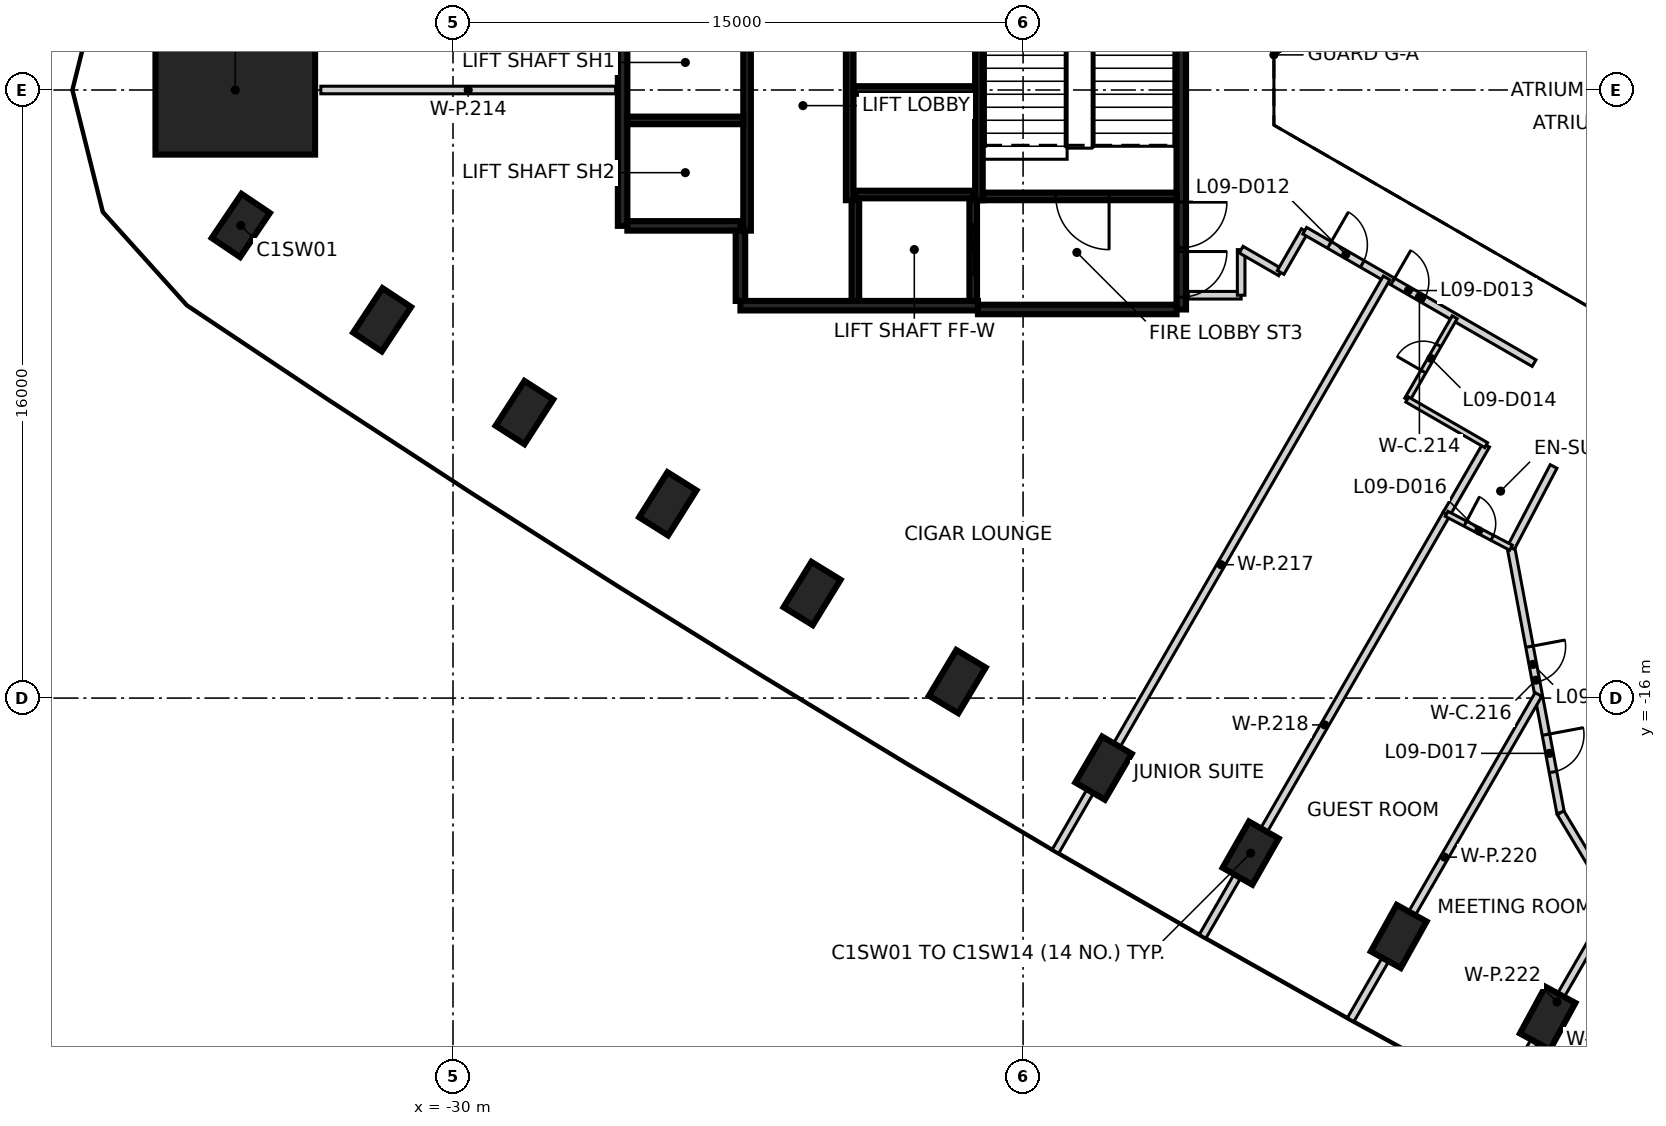
"""IFC4 building model, lengths in metres.
Left out: names, types, materials, properties, quantities, classifications, styles, units other than length and angle.
Written with IfcOpenShell. Run it as: python <this file> out.ifc"""

import sys

from ifc_helpers import new_model, si_unit, direction, frame, frame_2d, origin, origin_2d, place, context, subcontext, project, spatial, rectangle, extrude, element, fill, save


model = new_model("IFC4")
c1 = context("Model", 3, precision=1e-05, world=origin(), true_north=direction((0.0, 1.0)))
c2 = subcontext(c1, "Body", "Model", "MODEL_VIEW")
j1 = project(units=[si_unit("LENGTHUNIT", "METRE"), si_unit("PLANEANGLEUNIT", "RADIAN")], contexts=[c1])
p1 = place(None, origin())
s1 = spatial("IfcSite", under=j1, at=p1, CompositionType="ELEMENT")
p2 = place(p1, origin())
s2 = spatial("IfcBuilding", under=s1, at=p2, CompositionType="ELEMENT")
p3 = place(p2, frame((0.0, 0.0, 45.8)))
s3 = spatial("IfcBuildingStorey", under=s2, at=p3, CompositionType="ELEMENT", Elevation=45.8)
for number, where, z_axis, x_axis in (
    (1, (-35.583, -3.565, -0.475), (0.0, 0.0, 1.0), (0.559, 0.829, 0.0)),
    (2, (-31.865, -6.046, -0.475), (0.0, 0.0, 1.0), (0.551, 0.835, 0.0)),
    (3, (-28.12, -8.488, -0.475), (0.0, 0.0, 1.0), (0.541, 0.841, 0.0)),
    (4, (-24.349, -10.888, -0.475), (0.0, 0.0, 1.0), (0.532, 0.846, 0.0)),
    (5, (-20.552, -13.248, -0.475), (0.0, 0.0, 1.0), (0.523, 0.852, 0.0)),
    (6, (-16.73, -15.566, -0.475), (0.0, 0.0, 1.0), (0.514, 0.858, 0.0)),
    (7, (-12.883, -17.844, -0.475), (0.0, 0.0, 1.0), (0.505, 0.863, 0.0)),
    (8, (-9.011, -20.079, -0.475), (0.0, 0.0, 1.0), (0.495, 0.869, 0.0)),
    (9, (-5.116, -22.272, -0.475), (0.0, 0.0, 1.0), (0.486, 0.874, 0.0)),
    (10, (-1.197, -24.423, -0.475), (0.0, 0.0, 1.0), (0.476, 0.879, 0.0)),
):
    element("IfcColumn", number, at=place(p3, frame(where, z_axis=z_axis, x_axis=x_axis)), inside=s3, PredefinedType="COLUMN", context=c2, shape_type="SweptSolid", body=[
        extrude(rectangle(XDim=1.4, YDim=0.9, at=origin_2d()), origin(), (0.0, 0.0, 1.0), 3.6),
    ])
p4 = place(p3, frame((-35.729, 0.0, -0.475), z_axis=(0.0, 0.0, 1.0), x_axis=(1.0, 0.0, 0.0)))
e11 = element("IfcColumn", 11, at=p4, inside=s3, PredefinedType="COLUMN", context=c2, shape_type="SweptSolid", body=[
    extrude(rectangle(XDim=4.2, YDim=3.4, at=origin_2d()), origin(), (0.0, 0.0, 1.0), 3.6),
])
p5 = place(p3, frame((-10.837, 5.775, 0.0), z_axis=(0.0, 0.0, 1.0), x_axis=(0.0, -1.0, 0.0)))
e12 = element("IfcWall", 12, at=p5, inside=s3, PredefinedType="SHEAR", context=c2, shape_type="SweptSolid", body=[
    extrude(rectangle(XDim=11.55, YDim=0.25, at=frame_2d((5.775, 0.0))), origin(), (0.0, 0.0, 1.0), 3.125),
])
p6 = place(p5, frame((10.025, 0.0, 0.0)))
e13 = element("IfcOpeningElement", 13, at=p6, cuts=e12, PredefinedType="OPENING", context=c2, shape_type="SweptSolid", body=[
    extrude(rectangle(XDim=1.2, YDim=2.1, at=frame_2d((0.6, 1.05))), frame((0.0, 0.135, 0.0), z_axis=(0.0, -1.0, 0.0), x_axis=(1.0, 0.0, 0.0)), (0.0, 0.0, 1.0), 0.27),
])
p7 = place(p5, frame((8.725, 0.0, 0.0)))
e14 = element("IfcOpeningElement", 14, at=p7, cuts=e12, PredefinedType="OPENING", context=c2, shape_type="SweptSolid", body=[
    extrude(rectangle(XDim=1.2, YDim=2.1, at=frame_2d((0.6, 1.05))), frame((0.0, 0.135, 0.0), z_axis=(0.0, -1.0, 0.0), x_axis=(1.0, 0.0, 0.0)), (0.0, 0.0, 1.0), 0.27),
])
p8 = place(p3, frame((-16.187, -5.675, 0.0), z_axis=(0.0, 0.0, 1.0), x_axis=(-1.0, 0.0, 0.0)))
e15 = element("IfcWall", 15, at=p8, inside=s3, PredefinedType="SHEAR", context=c2, shape_type="SweptSolid", body=[
    extrude(rectangle(XDim=6.25, YDim=0.25, at=frame_2d((3.125, 0.0))), origin(), (0.0, 0.0, 1.0), 3.125),
])
p9 = place(p3, frame((-25.537, -3.575, 0.0), z_axis=(0.0, 0.0, 1.0), x_axis=(0.0, 1.0, 0.0)))
e16 = element("IfcWall", 16, at=p9, inside=s3, PredefinedType="SHEAR", context=c2, shape_type="SweptSolid", body=[
    extrude(rectangle(XDim=5.85, YDim=0.25, at=frame_2d((2.925, 0.0))), origin(), (0.0, 0.0, 1.0), 3.125),
])
p10 = place(p3, frame((-10.963, -5.775, 0.0), z_axis=(0.0, 0.0, 1.0), x_axis=(-1.0, 0.0, 0.0)))
e17 = element("IfcWall", 17, at=p10, inside=s3, PredefinedType="SHEAR", context=c2, shape_type="SweptSolid", body=[
    extrude(rectangle(XDim=5.225, YDim=0.25, at=frame_2d((2.612, 0.0))), origin(), (0.0, 0.0, 1.0), 3.125),
])
p11 = place(p3, frame((-22.437, -3.575, 0.0), z_axis=(0.0, 0.0, 1.0), x_axis=(-1.0, 0.0, 0.0)))
e18 = element("IfcWall", 18, at=p11, inside=s3, PredefinedType="SHEAR", context=c2, shape_type="SweptSolid", body=[
    extrude(rectangle(XDim=2.975, YDim=0.25, at=frame_2d((1.487, 0.0))), origin(), (0.0, 0.0, 1.0), 3.125),
])
p12 = place(p3, frame((-22.437, -5.55, 0.0), z_axis=(0.0, 0.0, 1.0), x_axis=(0.0, 1.0, 0.0)))
e19 = element("IfcWall", 19, at=p12, inside=s3, PredefinedType="SHEAR", context=c2, shape_type="SweptSolid", body=[
    extrude(rectangle(XDim=1.849, YDim=0.25, at=frame_2d((0.925, 0.0))), origin(), (0.0, 0.0, 1.0), 3.125),
])
p13 = place(p3, frame((-16.162, 2.951, 0.0), z_axis=(0.0, 0.0, 1.0), x_axis=(0.0, -1.0, 0.0)))
e20 = element("IfcWall", 20, at=p13, inside=s3, PredefinedType="SHEAR", context=c2, shape_type="SweptSolid", body=[
    extrude(rectangle(XDim=5.851, YDim=0.2, at=frame_2d((2.925, 0.0))), origin(), (0.0, 0.0, 1.0), 3.125),
])
for number, where, z_axis, x_axis in (
    (21, (-19.562, -2.9, 0.0), (0.0, 0.0, 1.0), (0.0, 1.0, 0.0)),
    (22, (-22.262, 2.4, 0.0), (0.0, 0.0, 1.0), (0.0, -1.0, 0.0)),
):
    element("IfcWall", number, at=place(p3, frame(where, z_axis=z_axis, x_axis=x_axis)), inside=s3, PredefinedType="SHEAR", context=c2, shape_type="SweptSolid", body=[
        extrude(rectangle(XDim=6.1, YDim=0.2, at=frame_2d((3.05, 0.0))), origin(), (0.0, 0.0, 1.0), 3.125),
    ])
p14 = place(p3, frame((-10.963, -2.8, 0.0), z_axis=(0.0, 0.0, 1.0), x_axis=(-1.0, 0.0, 0.0)))
e23 = element("IfcWall", 23, at=p14, inside=s3, PredefinedType="SHEAR", context=c2, shape_type="SweptSolid", body=[
    extrude(rectangle(XDim=5.098, YDim=0.2, at=frame_2d((2.549, 0.0))), origin(), (0.0, 0.0, 1.0), 3.125),
])
p15 = place(p14, frame((1.774, 0.0, 0.0)))
e24 = element("IfcOpeningElement", 24, at=p15, cuts=e23, PredefinedType="OPENING", context=c2, shape_type="SweptSolid", body=[
    extrude(rectangle(XDim=1.4, YDim=2.1, at=frame_2d((0.7, 1.05))), frame((0.0, 0.11, 0.0), z_axis=(0.0, -1.0, 0.0), x_axis=(1.0, 0.0, 0.0)), (0.0, 0.0, 1.0), 0.22),
])
p16 = place(p3, frame((-16.263, 0.0, 0.0), z_axis=(0.0, 0.0, 1.0), x_axis=(-1.0, 0.0, 0.0)))
e25 = element("IfcWall", 25, at=p16, inside=s3, PredefinedType="SHEAR", context=c2, shape_type="SweptSolid", body=[
    extrude(rectangle(XDim=3.198, YDim=0.2, at=frame_2d((1.599, 0.0))), origin(), (0.0, 0.0, 1.0), 3.125),
])
p17 = place(p3, frame((-22.363, -0.8, 0.0), z_axis=(0.0, 0.0, 1.0), x_axis=(-1.0, 0.0, 0.0)))
e26 = element("IfcWall", 26, at=p17, inside=s3, PredefinedType="SHEAR", context=c2, shape_type="SweptSolid", body=[
    extrude(rectangle(XDim=3.048, YDim=0.2, at=frame_2d((1.524, 0.0))), origin(), (0.0, 0.0, 1.0), 3.125),
])
p18 = place(p3, frame((-19.412, -2.75, 0.0), z_axis=(0.0, 0.0, 1.0), x_axis=(1.0, 0.0, 0.0)))
e27 = element("IfcWall", 27, at=p18, inside=s3, PredefinedType="SHEAR", context=c2, shape_type="SweptSolid", body=[
    extrude(rectangle(XDim=3.1, YDim=0.2, at=frame_2d((1.55, 0.0))), origin(), (0.0, 0.0, 1.0), 3.125),
])
p19 = place(p3, frame((-16.312, -2.898, 0.0), z_axis=(0.0, 0.0, 1.0), x_axis=(0.0, -1.0, 0.0)))
e28 = element("IfcWall", 28, at=p19, inside=s3, PredefinedType="SHEAR", context=c2, shape_type="SweptSolid", body=[
    extrude(rectangle(XDim=2.651, YDim=0.2, at=frame_2d((1.325, 0.0))), origin(), (0.0, 0.0, 1.0), 3.125),
])
p20 = place(p19, frame((0.652, 0.0, 0.0)))
e29 = element("IfcOpeningElement", 29, at=p20, cuts=e28, PredefinedType="OPENING", context=c2, shape_type="SweptSolid", body=[
    extrude(rectangle(XDim=1.3, YDim=2.1, at=frame_2d((0.65, 1.05))), frame((0.0, 0.11, 0.0), z_axis=(0.0, -1.0, 0.0), x_axis=(1.0, 0.0, 0.0)), (0.0, 0.0, 1.0), 0.22),
])
p21 = place(p3, frame((-19.412, -5.549, 0.0), z_axis=(0.0, 0.0, 1.0), x_axis=(0.0, 1.0, 0.0)))
e30 = element("IfcWall", 30, at=p21, inside=s3, PredefinedType="SHEAR", context=c2, shape_type="SweptSolid", body=[
    extrude(rectangle(XDim=2.651, YDim=0.2, at=frame_2d((1.325, 0.0))), origin(), (0.0, 0.0, 1.0), 3.125),
])
p22 = place(p3, frame((-10.652, -5.4, 0.0), z_axis=(0.0, 0.0, 1.0), x_axis=(1.0, 0.0, 0.0)))
e31 = element("IfcWall", 31, at=p22, inside=s3, PredefinedType="PARTITIONING", context=c2, shape_type="SweptSolid", body=[
    extrude(rectangle(XDim=1.39, YDim=0.2, at=frame_2d((0.695, 0.0))), origin(), (0.0, 0.0, 1.0), 3.125),
])
for number, where, z_axis, x_axis in (
    (32, (-9.262, -5.4, 0.0), (0.0, 0.0, 1.0), (0.0, 1.0, 0.0)),
    (33, (-9.262, -4.2, 0.0), (0.0, 0.0, 1.0), (0.866, -0.5, 0.0)),
):
    element("IfcWall", number, at=place(p3, frame(where, z_axis=z_axis, x_axis=x_axis)), inside=s3, PredefinedType="PARTITIONING", context=c2, shape_type="SweptSolid", body=[
        extrude(rectangle(XDim=1.2, YDim=0.2, at=frame_2d((0.6, 0.0))), origin(), (0.0, 0.0, 1.0), 3.125),
    ])
p23 = place(p3, frame((-8.223, -4.8, 0.0), z_axis=(0.0, 0.0, 1.0), x_axis=(0.499866914522, 0.866102227088, 0.0)))
e34 = element("IfcWall", 34, at=p23, inside=s3, PredefinedType="PARTITIONING", context=c2, shape_type="SweptSolid", body=[
    extrude(rectangle(XDim=1.268, YDim=0.2, at=frame_2d((0.634, 0.0))), origin(), (0.0, 0.0, 1.0), 3.125),
])
p24 = place(p3, frame((-7.589, -3.702, 0.0), z_axis=(0.0, 0.0, 1.0), x_axis=(0.865994210678, -0.500054024153, 0.0)))
e35 = element("IfcWall", 35, at=p24, inside=s3, PredefinedType="PARTITIONING", context=c2, shape_type="SweptSolid", body=[
    extrude(rectangle(XDim=6.969, YDim=0.2, at=frame_2d((3.484, 0.0))), origin(), (0.0, 0.0, 1.0), 3.125),
])
p25 = place(p24, frame((0.749, 0.0, 0.0)))
e36 = element("IfcOpeningElement", 36, at=p25, cuts=e35, PredefinedType="OPENING", context=c2, shape_type="SweptSolid", body=[
    extrude(rectangle(XDim=1.0, YDim=2.1, at=frame_2d((0.5, 1.05))), frame((0.0, 0.11, 0.0), z_axis=(0.0, -1.0, 0.0), x_axis=(1.0, 0.0, 0.0)), (0.0, 0.0, 1.0), 0.22),
])
p26 = place(p24, frame((2.674, 0.0, 0.0)))
e37 = element("IfcOpeningElement", 37, at=p26, cuts=e35, PredefinedType="OPENING", context=c2, shape_type="SweptSolid", body=[
    extrude(rectangle(XDim=0.95, YDim=2.1, at=frame_2d((0.475, 1.05))), frame((0.0, 0.11, 0.0), z_axis=(0.0, -1.0, 0.0), x_axis=(1.0, 0.0, 0.0)), (0.0, 0.0, 1.0), 0.22),
])
p27 = place(p3, frame((-2.162, -12.042, 0.0), z_axis=(0.0, 0.0, 1.0), x_axis=(0.183949825522, -0.982935634561, 0.0)))
e38 = element("IfcWall", 38, at=p27, inside=s3, PredefinedType="PARTITIONING", context=c2, shape_type="SweptSolid", body=[
    extrude(rectangle(XDim=7.094, YDim=0.2, at=frame_2d((3.547, 0.0))), origin(), (0.0, 0.0, 1.0), 3.125),
])
p28 = place(p27, frame((2.65, 0.0, 0.0)))
e39 = element("IfcOpeningElement", 39, at=p28, cuts=e38, PredefinedType="OPENING", context=c2, shape_type="SweptSolid", body=[
    extrude(rectangle(XDim=0.95, YDim=2.1, at=frame_2d((0.475, 1.05))), frame((0.0, 0.11, 0.0), z_axis=(0.0, -1.0, 0.0), x_axis=(1.0, 0.0, 0.0)), (0.0, 0.0, 1.0), 0.22),
])
p29 = place(p27, frame((5.006, 0.0, 0.0)))
e40 = element("IfcOpeningElement", 40, at=p29, cuts=e38, PredefinedType="OPENING", context=c2, shape_type="SweptSolid", body=[
    extrude(rectangle(XDim=1.0, YDim=2.1, at=frame_2d((0.5, 1.05))), frame((0.0, 0.11, 0.0), z_axis=(0.0, -1.0, 0.0), x_axis=(1.0, 0.0, 0.0)), (0.0, 0.0, 1.0), 0.22),
])
p30 = place(p3, frame((-2.162, -12.041, 0.0), z_axis=(0.0, 0.0, 1.0), x_axis=(0.464903343334, 0.885361441083, 0.0)))
e41 = element("IfcWall", 41, at=p30, inside=s3, PredefinedType="PARTITIONING", context=c2, shape_type="SweptSolid", body=[
    extrude(rectangle(XDim=2.411, YDim=0.2, at=frame_2d((1.206, 0.0))), origin(), (0.0, 0.0, 1.0), 3.125),
])
p31 = place(p3, frame((-0.858, -19.017, 0.0), z_axis=(0.0, 0.0, 1.0), x_axis=(0.514647068805, -0.857402119528, 0.0)))
e42 = element("IfcWall", 42, at=p31, inside=s3, PredefinedType="PARTITIONING", context=c2, shape_type="SweptSolid", body=[
    extrude(rectangle(XDim=4.745, YDim=0.2, at=frame_2d((2.373, 0.0))), origin(), (0.0, 0.0, 1.0), 3.125),
])
p32 = place(p3, frame((-33.478, 0.0, 0.0), z_axis=(0.0, 0.0, 1.0), x_axis=(1.0, 0.0, 0.0)))
e43 = element("IfcWall", 43, at=p32, inside=s3, PredefinedType="PARTITIONING", context=c2, shape_type="SweptSolid", body=[
    extrude(rectangle(XDim=7.756, YDim=0.2, at=frame_2d((3.878, 0.0))), origin(), (0.0, 0.0, 1.0), 3.125),
])
p33 = place(p3, frame((-14.148, -20.035, 0.0), z_axis=(0.0, 0.0, 1.0), x_axis=(0.499978771293, 0.866037659837, 0.0)))
e44 = element("IfcWall", 44, at=p33, inside=s3, PredefinedType="PARTITIONING", context=c2, shape_type="SweptSolid", body=[
    extrude(rectangle(XDim=17.425, YDim=0.2, at=frame_2d((8.712, 0.0))), origin(), (0.0, 0.0, 1.0), 3.125),
])
p34 = place(p3, frame((-10.276, -22.271, 0.0), z_axis=(0.0, 0.0, 1.0), x_axis=(0.499984478165, 0.866034365135, 0.0)))
e45 = element("IfcWall", 45, at=p34, inside=s3, PredefinedType="PARTITIONING", context=c2, shape_type="SweptSolid", body=[
    extrude(rectangle(XDim=12.851, YDim=0.2, at=frame_2d((6.426, 0.0))), origin(), (0.0, 0.0, 1.0), 3.125),
])
p35 = place(p3, frame((-6.381, -24.464, 0.0), z_axis=(0.0, 0.0, 1.0), x_axis=(0.500007577232, 0.866021029023, 0.0)))
e46 = element("IfcWall", 46, at=p35, inside=s3, PredefinedType="PARTITIONING", context=c2, shape_type="SweptSolid", body=[
    extrude(rectangle(XDim=9.883, YDim=0.2, at=frame_2d((4.941, 0.0))), origin(), (0.0, 0.0, 1.0), 3.125),
])
p36 = place(p3, frame((-3.863, -11.163, 0.0), z_axis=(0.0, 0.0, 1.0), x_axis=(0.499779509621, 0.866152666545, 0.0)))
e47 = element("IfcWall", 47, at=p36, inside=s3, PredefinedType="PARTITIONING", context=c2, shape_type="SweptSolid", body=[
    extrude(rectangle(XDim=2.099, YDim=0.2, at=frame_2d((1.05, 0.0))), origin(), (0.0, 0.0, 1.0), 3.125),
])
p37 = place(p3, frame((-2.462, -26.615, 0.0), z_axis=(0.0, 0.0, 1.0), x_axis=(0.49992636536, 0.86606791259, 0.0)))
e48 = element("IfcWall", 48, at=p37, inside=s3, PredefinedType="PARTITIONING", context=c2, shape_type="SweptSolid", body=[
    extrude(rectangle(XDim=6.046, YDim=0.2, at=frame_2d((3.023, 0.0))), origin(), (0.0, 0.0, 1.0), 3.125),
])
p38 = place(p3, frame((-4.892, -8.145, 0.0), z_axis=(0.0, 0.0, 1.0), x_axis=(0.499711178953, 0.866192090491, 0.0)))
e49 = element("IfcWall", 49, at=p38, inside=s3, PredefinedType="PARTITIONING", context=c2, shape_type="SweptSolid", body=[
    extrude(rectangle(XDim=2.5, YDim=0.15, at=frame_2d((1.25, 0.0))), origin(), (0.0, 0.0, 1.0), 3.125),
])
p39 = place(p38, frame((0.85, 0.0, 0.0)))
e50 = element("IfcOpeningElement", 50, at=p39, cuts=e49, PredefinedType="OPENING", context=c2, shape_type="SweptSolid", body=[
    extrude(rectangle(XDim=0.8, YDim=2.1, at=frame_2d((0.4, 1.05))), frame((0.0, 0.085, 0.0), z_axis=(0.0, -1.0, 0.0), x_axis=(1.0, 0.0, 0.0)), (0.0, 0.0, 1.0), 0.17),
])
p40 = place(p3, frame((-4.892, -8.145, 0.0), z_axis=(0.0, 0.0, 1.0), x_axis=(0.865999212041, -0.500045362686, 0.0)))
e51 = element("IfcWall", 51, at=p40, inside=s3, PredefinedType="PARTITIONING", context=c2, shape_type="SweptSolid", body=[
    extrude(rectangle(XDim=2.4, YDim=0.15, at=frame_2d((1.2, 0.0))), origin(), (0.0, 0.0, 1.0), 3.125),
])
p41 = place(p3, frame((-3.857, -11.152, 0.0), z_axis=(0.0, 0.0, 1.0), x_axis=(0.885374281086, -0.464878890026, 0.0)))
e52 = element("IfcWall", 52, at=p41, inside=s3, PredefinedType="PARTITIONING", context=c2, shape_type="SweptSolid", body=[
    extrude(rectangle(XDim=1.914, YDim=0.15, at=frame_2d((0.957, 0.0))), origin(), (0.0, 0.0, 1.0), 3.125),
])
p42 = place(p41, frame((0.557, 0.0, 0.0)))
e53 = element("IfcOpeningElement", 53, at=p42, cuts=e52, PredefinedType="OPENING", context=c2, shape_type="SweptSolid", body=[
    extrude(rectangle(XDim=0.8, YDim=2.1, at=frame_2d((0.4, 1.05))), frame((0.0, 0.085, 0.0), z_axis=(0.0, -1.0, 0.0), x_axis=(1.0, 0.0, 0.0)), (0.0, 0.0, 1.0), 0.17),
])
p43 = place(p20, origin())
e54 = element("IfcDoor", 54, at=p43, inside=s3, OperationType="SLIDING_TO_RIGHT", PredefinedType="DOOR", context=c2, shape_type="SweptSolid", body=[
    extrude(rectangle(XDim=1.3, YDim=2.1, at=frame_2d((0.65, 1.05))), frame((0.0, 0.025, 0.0), z_axis=(0.0, -1.0, 0.0), x_axis=(1.0, 0.0, 0.0)), (0.0, 0.0, 1.0), 0.05),
])
fill(e29, e54)
p44 = place(p6, origin())
e55 = element("IfcDoor", 55, at=p44, inside=s3, OperationType="SINGLE_SWING_LEFT", PredefinedType="DOOR", context=c2, shape_type="SweptSolid", body=[
    extrude(rectangle(XDim=1.2, YDim=2.1, at=frame_2d((0.6, 1.05))), frame((0.0, 0.025, 0.0), z_axis=(0.0, -1.0, 0.0), x_axis=(1.0, 0.0, 0.0)), (0.0, 0.0, 1.0), 0.05),
])
fill(e13, e55)
p45 = place(p7, origin())
e56 = element("IfcDoor", 56, at=p45, inside=s3, OperationType="SINGLE_SWING_RIGHT", PredefinedType="DOOR", context=c2, shape_type="SweptSolid", body=[
    extrude(rectangle(XDim=1.2, YDim=2.1, at=frame_2d((0.6, 1.05))), frame((0.0, 0.025, 0.0), z_axis=(0.0, -1.0, 0.0), x_axis=(1.0, 0.0, 0.0)), (0.0, 0.0, 1.0), 0.05),
])
fill(e14, e56)
p46 = place(p15, origin())
e57 = element("IfcDoor", 57, at=p46, inside=s3, OperationType="SINGLE_SWING_RIGHT", PredefinedType="DOOR", context=c2, shape_type="SweptSolid", body=[
    extrude(rectangle(XDim=1.4, YDim=2.1, at=frame_2d((0.7, 1.05))), frame((0.0, 0.025, 0.0), z_axis=(0.0, -1.0, 0.0), x_axis=(1.0, 0.0, 0.0)), (0.0, 0.0, 1.0), 0.05),
])
fill(e24, e57)
p47 = place(p25, frame((1.0, 0.0, 0.0), z_axis=(0.0, 0.0, 1.0), x_axis=(-1.0, 0.0, 0.0)))
e58 = element("IfcDoor", 58, at=p47, inside=s3, OperationType="SINGLE_SWING_LEFT", PredefinedType="DOOR", context=c2, shape_type="SweptSolid", body=[
    extrude(rectangle(XDim=1.0, YDim=2.1, at=frame_2d((0.5, 1.05))), frame((0.0, 0.025, 0.0), z_axis=(0.0, -1.0, 0.0), x_axis=(1.0, 0.0, 0.0)), (0.0, 0.0, 1.0), 0.05),
])
fill(e36, e58)
p48 = place(p26, frame((0.95, 0.0, 0.0), z_axis=(0.0, 0.0, 1.0), x_axis=(-1.0, 0.0, 0.0)))
e59 = element("IfcDoor", 59, at=p48, inside=s3, OperationType="SINGLE_SWING_LEFT", PredefinedType="DOOR", context=c2, shape_type="SweptSolid", body=[
    extrude(rectangle(XDim=0.95, YDim=2.1, at=frame_2d((0.475, 1.05))), frame((0.0, 0.025, 0.0), z_axis=(0.0, -1.0, 0.0), x_axis=(1.0, 0.0, 0.0)), (0.0, 0.0, 1.0), 0.05),
])
fill(e37, e59)
p49 = place(p39, frame((0.8, 0.0, 0.0), z_axis=(0.0, 0.0, 1.0), x_axis=(-1.0, 0.0, 0.0)))
e60 = element("IfcDoor", 60, at=p49, inside=s3, OperationType="SINGLE_SWING_LEFT", PredefinedType="DOOR", context=c2, shape_type="SweptSolid", body=[
    extrude(rectangle(XDim=0.8, YDim=2.1, at=frame_2d((0.4, 1.05))), frame((0.0, 0.025, 0.0), z_axis=(0.0, -1.0, 0.0), x_axis=(1.0, 0.0, 0.0)), (0.0, 0.0, 1.0), 0.05),
])
fill(e50, e60)
p50 = place(p28, frame((0.95, 0.0, 0.0), z_axis=(0.0, 0.0, 1.0), x_axis=(-1.0, 0.0, 0.0)))
e61 = element("IfcDoor", 61, at=p50, inside=s3, OperationType="SINGLE_SWING_LEFT", PredefinedType="DOOR", context=c2, shape_type="SweptSolid", body=[
    extrude(rectangle(XDim=0.95, YDim=2.1, at=frame_2d((0.475, 1.05))), frame((0.0, 0.025, 0.0), z_axis=(0.0, -1.0, 0.0), x_axis=(1.0, 0.0, 0.0)), (0.0, 0.0, 1.0), 0.05),
])
fill(e39, e61)
p51 = place(p42, frame((0.8, 0.0, 0.0), z_axis=(0.0, 0.0, 1.0), x_axis=(-1.0, 0.0, 0.0)))
e62 = element("IfcDoor", 62, at=p51, inside=s3, OperationType="SINGLE_SWING_LEFT", PredefinedType="DOOR", context=c2, shape_type="SweptSolid", body=[
    extrude(rectangle(XDim=0.8, YDim=2.1, at=frame_2d((0.4, 1.05))), frame((0.0, 0.025, 0.0), z_axis=(0.0, -1.0, 0.0), x_axis=(1.0, 0.0, 0.0)), (0.0, 0.0, 1.0), 0.05),
])
fill(e53, e62)
p52 = place(p29, frame((1.0, 0.0, 0.0), z_axis=(0.0, 0.0, 1.0), x_axis=(-1.0, 0.0, 0.0)))
e63 = element("IfcDoor", 63, at=p52, inside=s3, OperationType="SINGLE_SWING_LEFT", PredefinedType="DOOR", context=c2, shape_type="SweptSolid", body=[
    extrude(rectangle(XDim=1.0, YDim=2.1, at=frame_2d((0.5, 1.05))), frame((0.0, 0.025, 0.0), z_axis=(0.0, -1.0, 0.0), x_axis=(1.0, 0.0, 0.0)), (0.0, 0.0, 1.0), 0.05),
])
fill(e40, e63)
save(model, sys.argv[1])
